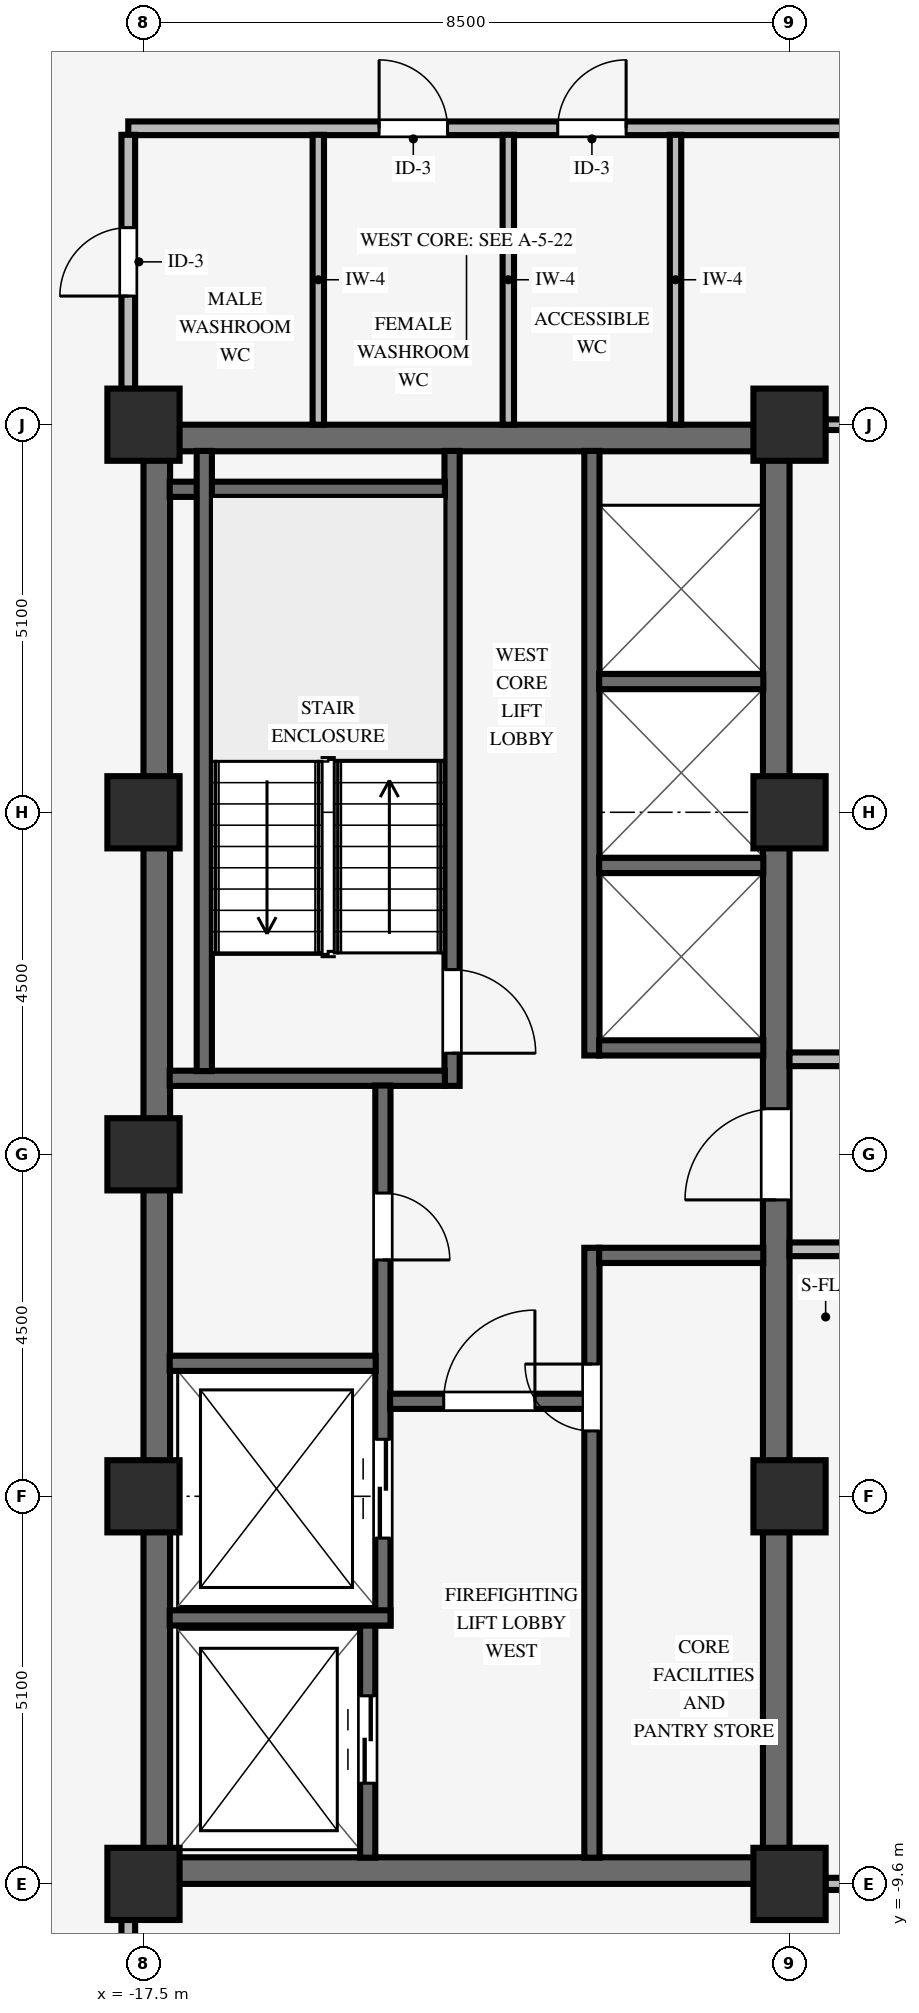
"""IFC4 building model, lengths in metres.
Left out: names, types, materials, properties, quantities, classifications, styles, units other than length and angle.
Written with IfcOpenShell. Run it as: python <this file> out.ifc"""

import sys

from ifc_helpers import new_model, si_unit, direction, frame, frame_2d, origin, origin_2d, place, context, subcontext, project, spatial, rectangle, extrude, source, transform, mapped, element, fill, save


model = new_model("IFC4")
c1 = context("Model", 3, precision=1e-05, world=origin(), true_north=direction((0.0, 1.0)))
c2 = subcontext(c1, "Body", "Model", "MODEL_VIEW")
j1 = project(units=[si_unit("LENGTHUNIT", "METRE"), si_unit("PLANEANGLEUNIT", "RADIAN")], contexts=[c1])
p1 = place(None, origin())
s1 = spatial("IfcSite", under=j1, at=p1, CompositionType="ELEMENT")
p2 = place(p1, origin())
s2 = spatial("IfcBuilding", under=s1, at=p2, CompositionType="ELEMENT")
p3 = place(p2, frame((0.0, 0.0, 190.9)))
s3 = spatial("IfcBuildingStorey", under=s2, at=p3, CompositionType="ELEMENT", Elevation=190.9)
for number, where, z_axis, x_axis in (
    (1, (-17.5, -9.425, 0.0), (0.0, 0.0, 1.0), (1.0, 0.0, 0.0)),
    (2, (-17.5, 9.425, 0.0), (0.0, 0.0, 1.0), (1.0, 0.0, 0.0)),
):
    element("IfcWall", number, at=place(p3, frame(where, z_axis=z_axis, x_axis=x_axis)), inside=s3, PredefinedType="SHEAR", context=c2, shape_type="SweptSolid", body=[
        extrude(rectangle(XDim=8.5, YDim=0.35, at=frame_2d((4.25, 0.0))), origin(), (0.0, 0.0, 1.0), 3.37),
    ])
p4 = place(p3, frame((-17.325, -9.255, 0.0), z_axis=(0.0, 0.0, 1.0), x_axis=(0.0, 1.0, 0.0)))
e3 = element("IfcWall", 3, at=p4, inside=s3, PredefinedType="SHEAR", context=c2, shape_type="SweptSolid", body=[
    extrude(rectangle(XDim=18.51, YDim=0.35, at=frame_2d((9.255, 0.0))), origin(), (0.0, 0.0, 1.0), 3.37),
])
p5 = place(p3, frame((-9.175, -9.255, 0.0), z_axis=(0.0, 0.0, 1.0), x_axis=(0.0, 1.0, 0.0)))
e4 = element("IfcWall", 4, at=p5, inside=s3, PredefinedType="SHEAR", context=c2, shape_type="SweptSolid", body=[
    extrude(rectangle(XDim=18.51, YDim=0.35, at=frame_2d((9.255, 0.0))), origin(), (0.0, 0.0, 1.0), 3.37),
])
p6 = place(p5, frame((8.655, 0.0, 0.0)))
e5 = element("IfcOpeningElement", 5, at=p6, cuts=e4, PredefinedType="OPENING", context=c2, shape_type="SweptSolid", body=[
    extrude(rectangle(XDim=1.2, YDim=2.15, at=frame_2d((0.6, 1.075))), frame((0.0, 0.185, 0.0), z_axis=(0.0, -1.0, 0.0), x_axis=(1.0, 0.0, 0.0)), (0.0, 0.0, 1.0), 0.37),
])
for number, where, z_axis, x_axis in (
    (6, (-17.5, -9.6, 0.0), (0.0, 0.0, 1.0), (1.0, 0.0, 0.0)),
    (7, (-17.5, -4.5, 0.0), (0.0, 0.0, 1.0), (1.0, 0.0, 0.0)),
    (8, (-17.5, 4.5, 0.0), (0.0, 0.0, 1.0), (1.0, 0.0, 0.0)),
    (9, (-17.5, 9.6, 0.0), (0.0, 0.0, 1.0), (1.0, 0.0, 0.0)),
    (10, (-9.0, -9.6, 0.0), (0.0, 0.0, 1.0), (1.0, 0.0, 0.0)),
    (11, (-9.0, -4.5, 0.0), (0.0, 0.0, 1.0), (1.0, 0.0, 0.0)),
    (12, (-9.0, 4.5, 0.0), (0.0, 0.0, 1.0), (1.0, 0.0, 0.0)),
    (13, (-9.0, 9.6, 0.0), (0.0, 0.0, 1.0), (1.0, 0.0, 0.0)),
    (14, (-17.5, 0.0, 0.0), (0.0, 0.0, 1.0), (1.0, 0.0, 0.0)),
):
    element("IfcColumn", number, at=place(p3, frame(where, z_axis=z_axis, x_axis=x_axis)), inside=s3, PredefinedType="COLUMN", context=c2, shape_type="SweptSolid", body=[
        extrude(rectangle(XDim=0.95, YDim=0.95, at=origin_2d()), origin(), (0.0, 0.0, 1.0), 3.37),
    ])
p7 = place(p3, frame((-13.44, 0.9, 0.0), z_axis=(0.0, 0.0, 1.0), x_axis=(0.0, 1.0, 0.0)))
e15 = element("IfcWall", 15, at=p7, inside=s3, PredefinedType="SHEAR", context=c2, shape_type="SweptSolid", body=[
    extrude(rectangle(XDim=8.355, YDim=0.2, at=frame_2d((4.177, 0.0))), origin(), (0.0, 0.0, 1.0), 3.37),
])
p8 = place(p7, frame((1.53, 0.0, 0.0), z_axis=(0.0, 0.0, 1.0), x_axis=(-1.0, 0.0, 0.0)))
e16 = element("IfcOpeningElement", 16, at=p8, cuts=e15, PredefinedType="OPENING", context=c2, shape_type="SweptSolid", body=[
    extrude(rectangle(XDim=1.1, YDim=2.15, at=frame_2d((0.55, 1.075))), frame((0.0, 0.11, 0.0), z_axis=(0.0, -1.0, 0.0), x_axis=(1.0, 0.0, 0.0)), (0.0, 0.0, 1.0), 0.22),
])
for number, where, z_axis, x_axis in (
    (17, (-17.155, 1.0, 0.0), (0.0, 0.0, 1.0), (1.0, 0.0, 0.0)),
    (18, (-17.155, 8.75, 0.0), (0.0, 0.0, 1.0), (1.0, 0.0, 0.0)),
):
    element("IfcWall", number, at=place(p3, frame(where, z_axis=z_axis, x_axis=x_axis)), inside=s3, PredefinedType="SHEAR", context=c2, shape_type="SweptSolid", body=[
        extrude(rectangle(XDim=3.62, YDim=0.2, at=frame_2d((1.81, 0.0))), origin(), (0.0, 0.0, 1.0), 3.37),
    ])
p9 = place(p3, frame((-16.7, 1.095, 0.0), z_axis=(0.0, 0.0, 1.0), x_axis=(0.0, 1.0, 0.0)))
e19 = element("IfcWall", 19, at=p9, inside=s3, PredefinedType="SHEAR", context=c2, shape_type="SweptSolid", body=[
    extrude(rectangle(XDim=8.16, YDim=0.2, at=frame_2d((4.08, 0.0))), origin(), (0.0, 0.0, 1.0), 3.37),
])
p10 = place(p3, frame((-14.55, -9.255, 0.0), z_axis=(0.0, 0.0, 1.0), x_axis=(0.0, 1.0, 0.0)))
e20 = element("IfcWall", 20, at=p10, inside=s3, PredefinedType="SHEAR", context=c2, shape_type="SweptSolid", body=[
    extrude(rectangle(XDim=3.06, YDim=0.2, at=frame_2d((1.53, 0.0))), origin(), (0.0, 0.0, 1.0), 3.37),
])
p11 = place(p10, frame((0.98, 0.0, 0.0)))
e21 = element("IfcOpeningElement", 21, at=p11, cuts=e20, PredefinedType="OPENING", context=c2, shape_type="SweptSolid", body=[
    extrude(rectangle(XDim=1.15, YDim=2.15, at=frame_2d((0.575, 1.075))), frame((0.0, 0.11, 0.0), z_axis=(0.0, -1.0, 0.0), x_axis=(1.0, 0.0, 0.0)), (0.0, 0.0, 1.0), 0.22),
])
p12 = place(p3, frame((-14.35, -6.2, 0.0), z_axis=(0.0, 0.0, 1.0), x_axis=(0.0, 1.0, 0.0)))
e22 = element("IfcWall", 22, at=p12, inside=s3, PredefinedType="SHEAR", context=c2, shape_type="SweptSolid", body=[
    extrude(rectangle(XDim=7.105, YDim=0.2, at=frame_2d((3.552, 0.0))), origin(), (0.0, 0.0, 1.0), 3.37),
])
p13 = place(p12, frame((5.69, 0.0, 0.0), z_axis=(0.0, 0.0, 1.0), x_axis=(-1.0, 0.0, 0.0)))
e23 = element("IfcOpeningElement", 23, at=p13, cuts=e22, PredefinedType="OPENING", context=c2, shape_type="SweptSolid", body=[
    extrude(rectangle(XDim=0.88, YDim=2.1, at=frame_2d((0.44, 1.05))), frame((0.0, 0.11, 0.0), z_axis=(0.0, -1.0, 0.0), x_axis=(1.0, 0.0, 0.0)), (0.0, 0.0, 1.0), 0.22),
])
p14 = place(p12, frame((1.15, 0.0, 0.0)))
e24 = element("IfcOpeningElement", 24, at=p14, cuts=e22, PredefinedType="OPENING", context=c2, shape_type="SweptSolid", body=[
    extrude(rectangle(XDim=1.3, YDim=2.2, at=frame_2d((0.65, 1.1))), frame((0.0, 0.11, 0.0), z_axis=(0.0, -1.0, 0.0), x_axis=(1.0, 0.0, 0.0)), (0.0, 0.0, 1.0), 0.22),
])
p15 = place(p3, frame((-17.155, -6.1, 0.0), z_axis=(0.0, 0.0, 1.0), x_axis=(1.0, 0.0, 0.0)))
e25 = element("IfcWall", 25, at=p15, inside=s3, PredefinedType="SHEAR", context=c2, shape_type="SweptSolid", body=[
    extrude(rectangle(XDim=2.905, YDim=0.2, at=frame_2d((1.453, 0.0))), origin(), (0.0, 0.0, 1.0), 3.37),
])
p16 = place(p3, frame((-17.155, -2.75, 0.0), z_axis=(0.0, 0.0, 1.0), x_axis=(1.0, 0.0, 0.0)))
e26 = element("IfcWall", 26, at=p16, inside=s3, PredefinedType="SHEAR", context=c2, shape_type="SweptSolid", body=[
    extrude(rectangle(XDim=2.71, YDim=0.2, at=frame_2d((1.355, 0.0))), origin(), (0.0, 0.0, 1.0), 3.37),
])
p17 = place(p3, frame((-11.6, -9.255, 0.0), z_axis=(0.0, 0.0, 1.0), x_axis=(0.0, 1.0, 0.0)))
e27 = element("IfcWall", 27, at=p17, inside=s3, PredefinedType="SHEAR", context=c2, shape_type="SweptSolid", body=[
    extrude(rectangle(XDim=8.025, YDim=0.2, at=frame_2d((4.012, 0.0))), origin(), (0.0, 0.0, 1.0), 3.37),
])
p18 = place(p17, frame((5.615, 0.0, 0.0)))
e28 = element("IfcOpeningElement", 28, at=p18, cuts=e27, PredefinedType="OPENING", context=c2, shape_type="SweptSolid", body=[
    extrude(rectangle(XDim=0.88, YDim=2.1, at=frame_2d((0.44, 1.05))), frame((0.0, 0.11, 0.0), z_axis=(0.0, -1.0, 0.0), x_axis=(1.0, 0.0, 0.0)), (0.0, 0.0, 1.0), 0.22),
])
p19 = place(p3, frame((-14.255, -3.25, 0.0), z_axis=(0.0, 0.0, 1.0), x_axis=(1.0, 0.0, 0.0)))
e29 = element("IfcWall", 29, at=p19, inside=s3, PredefinedType="SHEAR", context=c2, shape_type="SweptSolid", body=[
    extrude(rectangle(XDim=2.56, YDim=0.2, at=frame_2d((1.28, 0.0))), origin(), (0.0, 0.0, 1.0), 3.37),
])
p20 = place(p19, frame((0.705, 0.0, 0.0)))
e30 = element("IfcOpeningElement", 30, at=p20, cuts=e29, PredefinedType="OPENING", context=c2, shape_type="SweptSolid", body=[
    extrude(rectangle(XDim=1.2, YDim=2.15, at=frame_2d((0.6, 1.075))), frame((0.0, 0.11, 0.0), z_axis=(0.0, -1.0, 0.0), x_axis=(1.0, 0.0, 0.0)), (0.0, 0.0, 1.0), 0.22),
])
p21 = place(p3, frame((-11.505, -1.33, 0.0), z_axis=(0.0, 0.0, 1.0), x_axis=(1.0, 0.0, 0.0)))
e31 = element("IfcWall", 31, at=p21, inside=s3, PredefinedType="SHEAR", context=c2, shape_type="SweptSolid", body=[
    extrude(rectangle(XDim=2.16, YDim=0.2, at=frame_2d((1.08, 0.0))), origin(), (0.0, 0.0, 1.0), 3.37),
])
p22 = place(p3, frame((-11.6, 1.3, 0.0), z_axis=(0.0, 0.0, 1.0), x_axis=(0.0, 1.0, 0.0)))
e32 = element("IfcWall", 32, at=p22, inside=s3, PredefinedType="SHEAR", context=c2, shape_type="SweptSolid", body=[
    extrude(rectangle(XDim=7.955, YDim=0.2, at=frame_2d((3.978, 0.0))), origin(), (0.0, 0.0, 1.0), 3.37),
])
for number, where, z_axis, x_axis in (
    (33, (-11.505, 1.4, 0.0), (0.0, 0.0, 1.0), (1.0, 0.0, 0.0)),
    (34, (-11.505, 3.8, 0.0), (0.0, 0.0, 1.0), (1.0, 0.0, 0.0)),
    (35, (-11.505, 6.22, 0.0), (0.0, 0.0, 1.0), (1.0, 0.0, 0.0)),
):
    element("IfcWall", number, at=place(p3, frame(where, z_axis=z_axis, x_axis=x_axis)), inside=s3, PredefinedType="SHEAR", context=c2, shape_type="SweptSolid", body=[
        extrude(rectangle(XDim=2.16, YDim=0.2, at=frame_2d((1.08, 0.0))), origin(), (0.0, 0.0, 1.0), 3.37),
    ])
p23 = place(p3, frame((-8.529, -9.6, 0.0), z_axis=(0.0, 0.0, 1.0), x_axis=(1.0, 0.0, 0.0)))
e36 = element("IfcWall", 36, at=p23, inside=s3, PredefinedType="PARTITIONING", context=c2, shape_type="SweptSolid", body=[
    extrude(rectangle(XDim=8.378, YDim=0.16, at=frame_2d((4.189, 0.0))), origin(), (0.0, 0.0, 1.0), 2.405),
])
p24 = place(p3, frame((-9.0, -1.25, 0.0), z_axis=(0.0, 0.0, 1.0), x_axis=(1.0, 0.0, 0.0)))
e37 = element("IfcWall", 37, at=p24, inside=s3, PredefinedType="PARTITIONING", context=c2, shape_type="SweptSolid", body=[
    extrude(rectangle(XDim=15.6, YDim=0.18, at=frame_2d((7.8, 0.0))), origin(), (0.0, 0.0, 1.0), 3.36),
])
p25 = place(p24, frame((5.42, 0.0, 0.0)))
e38 = element("IfcOpeningElement", 38, at=p25, cuts=e37, PredefinedType="OPENING", context=c2, shape_type="SweptSolid", body=[
    extrude(rectangle(XDim=0.96, YDim=2.1, at=frame_2d((0.48, 1.05))), frame((0.0, 0.1, 0.0), z_axis=(0.0, -1.0, 0.0), x_axis=(1.0, 0.0, 0.0)), (0.0, 0.0, 1.0), 0.2),
])
p26 = place(p3, frame((-9.0, 1.25, 0.0), z_axis=(0.0, 0.0, 1.0), x_axis=(1.0, 0.0, 0.0)))
e39 = element("IfcWall", 39, at=p26, inside=s3, PredefinedType="PARTITIONING", context=c2, shape_type="SweptSolid", body=[
    extrude(rectangle(XDim=15.6, YDim=0.18, at=frame_2d((7.8, 0.0))), origin(), (0.0, 0.0, 1.0), 3.36),
])
p27 = place(p26, frame((10.42, 0.0, 0.0)))
e40 = element("IfcOpeningElement", 40, at=p27, cuts=e39, PredefinedType="OPENING", context=c2, shape_type="SweptSolid", body=[
    extrude(rectangle(XDim=0.96, YDim=2.1, at=frame_2d((0.48, 1.05))), frame((0.0, 0.1, 0.0), z_axis=(0.0, -1.0, 0.0), x_axis=(1.0, 0.0, 0.0)), (0.0, 0.0, 1.0), 0.2),
])
p28 = place(p26, frame((2.62, 0.0, 0.0)))
e41 = element("IfcOpeningElement", 41, at=p28, cuts=e39, PredefinedType="OPENING", context=c2, shape_type="SweptSolid", body=[
    extrude(rectangle(XDim=0.96, YDim=2.1, at=frame_2d((0.48, 1.05))), frame((0.0, 0.1, 0.0), z_axis=(0.0, -1.0, 0.0), x_axis=(1.0, 0.0, 0.0)), (0.0, 0.0, 1.0), 0.2),
])
p29 = place(p3, frame((-8.529, 9.6, 0.0), z_axis=(0.0, 0.0, 1.0), x_axis=(1.0, 0.0, 0.0)))
e42 = element("IfcWall", 42, at=p29, inside=s3, PredefinedType="PARTITIONING", context=c2, shape_type="SweptSolid", body=[
    extrude(rectangle(XDim=8.378, YDim=0.14, at=frame_2d((4.189, 0.0))), origin(), (0.0, 0.0, 1.0), 2.405),
])
p30 = place(p3, frame((-17.7, 13.5, 0.0), z_axis=(0.0, 0.0, 1.0), x_axis=(1.0, 0.0, 0.0)))
e43 = element("IfcWall", 43, at=p30, inside=s3, PredefinedType="PARTITIONING", context=c2, shape_type="SweptSolid", body=[
    extrude(rectangle(XDim=24.3, YDim=0.18, at=frame_2d((12.15, 0.0))), origin(), (0.0, 0.0, 1.0), 3.008),
])
p31 = place(p30, frame((11.97, 0.0, 0.0)))
e44 = element("IfcOpeningElement", 44, at=p31, cuts=e43, PredefinedType="OPENING", context=c2, shape_type="SweptSolid", body=[
    extrude(rectangle(XDim=0.96, YDim=2.1, at=frame_2d((0.48, 1.05))), frame((0.0, 0.1, 0.0), z_axis=(0.0, -1.0, 0.0), x_axis=(1.0, 0.0, 0.0)), (0.0, 0.0, 1.0), 0.2),
])
p32 = place(p30, frame((20.52, 0.0, 0.0)))
e45 = element("IfcOpeningElement", 45, at=p32, cuts=e43, PredefinedType="OPENING", context=c2, shape_type="SweptSolid", body=[
    extrude(rectangle(XDim=0.96, YDim=2.1, at=frame_2d((0.48, 1.05))), frame((0.0, 0.1, 0.0), z_axis=(0.0, -1.0, 0.0), x_axis=(1.0, 0.0, 0.0)), (0.0, 0.0, 1.0), 0.2),
])
p33 = place(p30, frame((3.3, 0.0, 0.0)))
e46 = element("IfcOpeningElement", 46, at=p33, cuts=e43, PredefinedType="OPENING", context=c2, shape_type="SweptSolid", body=[
    extrude(rectangle(XDim=0.9, YDim=2.1, at=frame_2d((0.45, 1.05))), frame((0.0, 0.1, 0.0), z_axis=(0.0, -1.0, 0.0), x_axis=(1.0, 0.0, 0.0)), (0.0, 0.0, 1.0), 0.2),
])
p34 = place(p30, frame((5.65, 0.0, 0.0)))
e47 = element("IfcOpeningElement", 47, at=p34, cuts=e43, PredefinedType="OPENING", context=c2, shape_type="SweptSolid", body=[
    extrude(rectangle(XDim=0.9, YDim=2.1, at=frame_2d((0.45, 1.05))), frame((0.0, 0.1, 0.0), z_axis=(0.0, -1.0, 0.0), x_axis=(1.0, 0.0, 0.0)), (0.0, 0.0, 1.0), 0.2),
])
p35 = place(p3, frame((-17.7, -13.414, 0.0), z_axis=(0.0, 0.0, 1.0), x_axis=(0.0, 1.0, 0.0)))
e48 = element("IfcWall", 48, at=p35, inside=s3, PredefinedType="PARTITIONING", context=c2, shape_type="SweptSolid", body=[
    extrude(rectangle(XDim=3.343, YDim=0.18, at=frame_2d((1.671, 0.0))), origin(), (0.0, 0.0, 1.0), 2.816),
])
p36 = place(p3, frame((-17.7, 10.071, 0.0), z_axis=(0.0, 0.0, 1.0), x_axis=(0.0, 1.0, 0.0)))
e49 = element("IfcWall", 49, at=p36, inside=s3, PredefinedType="PARTITIONING", context=c2, shape_type="SweptSolid", body=[
    extrude(rectangle(XDim=3.343, YDim=0.18, at=frame_2d((1.671, 0.0))), origin(), (0.0, 0.0, 1.0), 2.816),
])
p37 = place(p36, frame((1.221, 0.0, 0.0)))
e50 = element("IfcOpeningElement", 50, at=p37, cuts=e49, PredefinedType="OPENING", context=c2, shape_type="SweptSolid", body=[
    extrude(rectangle(XDim=0.9, YDim=2.1, at=frame_2d((0.45, 1.05))), frame((0.0, 0.1, 0.0), z_axis=(0.0, -1.0, 0.0), x_axis=(1.0, 0.0, 0.0)), (0.0, 0.0, 1.0), 0.2),
])
for number, where, z_axis, x_axis in (
    (51, (-15.2, 9.6, 0.0), (0.0, 0.0, 1.0), (0.0, 1.0, 0.0)),
    (52, (-12.7, 9.6, 0.0), (0.0, 0.0, 1.0), (0.0, 1.0, 0.0)),
    (53, (-10.5, 9.6, 0.0), (0.0, 0.0, 1.0), (0.0, 1.0, 0.0)),
):
    element("IfcWall", number, at=place(p3, frame(where, z_axis=z_axis, x_axis=x_axis)), inside=s3, PredefinedType="PARTITIONING", context=c2, shape_type="SweptSolid", body=[
        extrude(rectangle(XDim=3.814, YDim=0.15, at=frame_2d((1.907, 0.0))), origin(), (0.0, 0.0, 1.0), 3.36),
    ])
m1 = source(origin(), c2, "Body", "SweptSolid", [
    extrude(rectangle(XDim=1.1, YDim=2.15, at=frame_2d((0.55, 1.075))), frame((0.0, 0.025, 0.0), z_axis=(0.0, -1.0, 0.0), x_axis=(1.0, 0.0, 0.0)), (0.0, 0.0, 1.0), 0.05),
])
p38 = place(p8, origin())
e54 = element("IfcDoor", 54, at=p38, inside=s3, OperationType="SINGLE_SWING_RIGHT", PredefinedType="DOOR", context=c2, shape_type="MappedRepresentation", body=[
    mapped(m1, transform((0.0, 0.0, 0.0), scale=1.0)),
])
fill(e16, e54)
m2 = source(origin(), c2, "Body", "SweptSolid", [
    extrude(rectangle(XDim=0.88, YDim=2.1, at=frame_2d((0.44, 1.05))), frame((0.0, 0.025, 0.0), z_axis=(0.0, -1.0, 0.0), x_axis=(1.0, 0.0, 0.0)), (0.0, 0.0, 1.0), 0.05),
])
p39 = place(p13, origin())
e55 = element("IfcDoor", 55, at=p39, inside=s3, OperationType="SINGLE_SWING_RIGHT", PredefinedType="DOOR", context=c2, shape_type="MappedRepresentation", body=[
    mapped(m2, transform((0.0, 0.0, 0.0), scale=1.0)),
])
fill(e23, e55)
m3 = source(origin(), c2, "Body", "SweptSolid", [
    extrude(rectangle(XDim=1.2, YDim=2.15, at=frame_2d((0.6, 1.075))), frame((0.0, 0.025, 0.0), z_axis=(0.0, -1.0, 0.0), x_axis=(1.0, 0.0, 0.0)), (0.0, 0.0, 1.0), 0.05),
])
p40 = place(p20, origin())
e56 = element("IfcDoor", 56, at=p40, inside=s3, OperationType="SINGLE_SWING_RIGHT", PredefinedType="DOOR", context=c2, shape_type="MappedRepresentation", body=[
    mapped(m3, transform((0.0, 0.0, 0.0), scale=1.0)),
])
fill(e30, e56)
p41 = place(p18, origin())
e57 = element("IfcDoor", 57, at=p41, inside=s3, OperationType="SINGLE_SWING_RIGHT", PredefinedType="DOOR", context=c2, shape_type="MappedRepresentation", body=[
    mapped(m2, transform((0.0, 0.0, 0.0), scale=1.0)),
])
fill(e28, e57)
p42 = place(p6, origin())
e58 = element("IfcDoor", 58, at=p42, inside=s3, OperationType="SINGLE_SWING_LEFT", PredefinedType="DOOR", context=c2, shape_type="MappedRepresentation", body=[
    mapped(m3, transform((0.0, 0.0, 0.0), scale=1.0)),
])
fill(e5, e58)
m4 = source(origin(), c2, "Body", "SweptSolid", [
    extrude(rectangle(XDim=1.15, YDim=2.15, at=frame_2d((0.575, 1.075))), frame((0.0, 0.025, 0.0), z_axis=(0.0, -1.0, 0.0), x_axis=(1.0, 0.0, 0.0)), (0.0, 0.0, 1.0), 0.05),
])
p43 = place(p11, origin())
e59 = element("IfcDoor", 59, at=p43, inside=s3, OperationType="DOUBLE_DOOR_SLIDING", PredefinedType="DOOR", context=c2, shape_type="MappedRepresentation", body=[
    mapped(m4, transform((0.0, 0.0, 0.0), scale=1.0)),
])
fill(e21, e59)
m5 = source(origin(), c2, "Body", "SweptSolid", [
    extrude(rectangle(XDim=1.3, YDim=2.2, at=frame_2d((0.65, 1.1))), frame((0.0, 0.025, 0.0), z_axis=(0.0, -1.0, 0.0), x_axis=(1.0, 0.0, 0.0)), (0.0, 0.0, 1.0), 0.05),
])
p44 = place(p14, origin())
e60 = element("IfcDoor", 60, at=p44, inside=s3, OperationType="DOUBLE_DOOR_SLIDING", PredefinedType="DOOR", context=c2, shape_type="MappedRepresentation", body=[
    mapped(m5, transform((0.0, 0.0, 0.0), scale=1.0)),
])
fill(e24, e60)
m6 = source(origin(), c2, "Body", "SweptSolid", [
    extrude(rectangle(XDim=0.9, YDim=2.1, at=frame_2d((0.45, 1.05))), frame((0.0, 0.025, 0.0), z_axis=(0.0, -1.0, 0.0), x_axis=(1.0, 0.0, 0.0)), (0.0, 0.0, 1.0), 0.05),
])
p45 = place(p37, origin())
e61 = element("IfcDoor", 61, at=p45, inside=s3, OperationType="SINGLE_SWING_LEFT", PredefinedType="DOOR", context=c2, shape_type="MappedRepresentation", body=[
    mapped(m6, transform((0.0, 0.0, 0.0), scale=1.0)),
])
fill(e50, e61)
p46 = place(p33, origin())
e62 = element("IfcDoor", 62, at=p46, inside=s3, OperationType="SINGLE_SWING_LEFT", PredefinedType="DOOR", context=c2, shape_type="MappedRepresentation", body=[
    mapped(m6, transform((0.0, 0.0, 0.0), scale=1.0)),
])
fill(e46, e62)
p47 = place(p34, origin())
e63 = element("IfcDoor", 63, at=p47, inside=s3, OperationType="SINGLE_SWING_RIGHT", PredefinedType="DOOR", context=c2, shape_type="MappedRepresentation", body=[
    mapped(m6, transform((0.0, 0.0, 0.0), scale=1.0)),
])
fill(e47, e63)
save(model, sys.argv[1])
